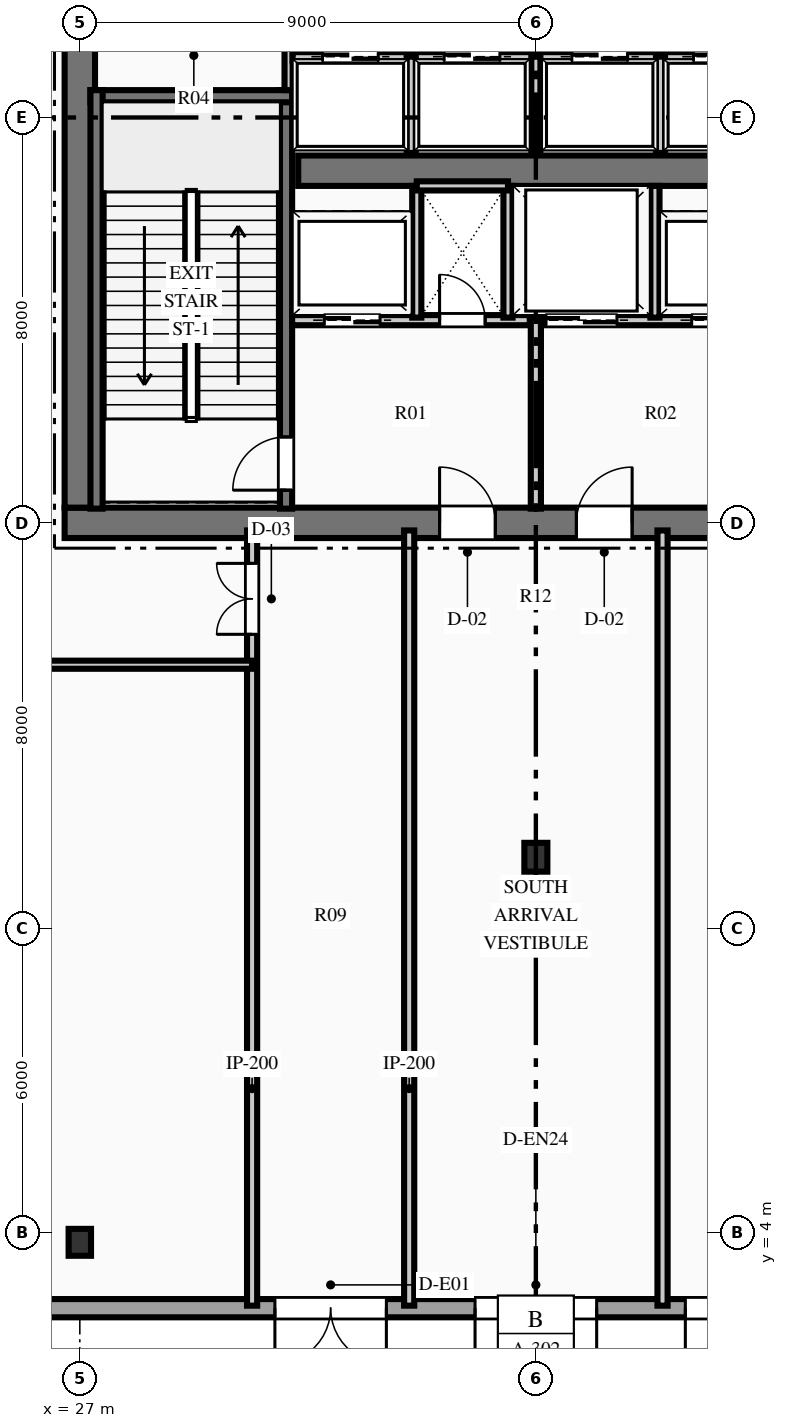
"""IFC4 building model, lengths in metres.
Left out: names, types, materials, properties, quantities, classifications, styles, units other than length and angle.
Written with IfcOpenShell. Run it as: python <this file> out.ifc"""

import sys

from ifc_helpers import new_model, si_unit, direction, frame, frame_2d, origin, origin_2d, place, context, subcontext, project, spatial, rectangle, i_section, extrude, element, fill, save


model = new_model("IFC4")
c1 = context("Model", 3, precision=1e-05, world=origin(), true_north=direction((0.0, 1.0)))
c2 = subcontext(c1, "Body", "Model", "MODEL_VIEW")
j1 = project(units=[si_unit("LENGTHUNIT", "METRE"), si_unit("PLANEANGLEUNIT", "RADIAN")], contexts=[c1])
p1 = place(None, origin())
s1 = spatial("IfcSite", under=j1, at=p1, CompositionType="ELEMENT")
p2 = place(p1, origin())
s2 = spatial("IfcBuilding", under=s1, at=p2, CompositionType="ELEMENT")
p3 = place(p2, origin())
s3 = spatial("IfcBuildingStorey", under=s2, at=p3, CompositionType="ELEMENT", Elevation=0.0)
p4 = place(p3, frame((26.7, 18.0, 0.0), z_axis=(0.0, 0.0, 1.0), x_axis=(1.0, 0.0, 0.0)))
e1 = element("IfcWall", 1, at=p4, inside=s3, PredefinedType="SHEAR", context=c2, shape_type="SweptSolid", body=[
    extrude(rectangle(XDim=18.6, YDim=0.6, at=frame_2d((9.3, 0.0))), origin(), (0.0, 0.0, 1.0), 6.0),
])
p5 = place(p4, frame((7.4, 0.0, 0.0)))
e2 = element("IfcOpeningElement", 2, at=p5, cuts=e1, PredefinedType="OPENING", context=c2, shape_type="SweptSolid", body=[
    extrude(rectangle(XDim=1.1, YDim=2.15, at=frame_2d((0.55, 1.075))), frame((0.0, 0.31, 0.0), z_axis=(0.0, -1.0, 0.0), x_axis=(1.0, 0.0, 0.0)), (0.0, 0.0, 1.0), 0.62),
])
p6 = place(p4, frame((10.1, 0.0, 0.0)))
e3 = element("IfcOpeningElement", 3, at=p6, cuts=e1, PredefinedType="OPENING", context=c2, shape_type="SweptSolid", body=[
    extrude(rectangle(XDim=1.1, YDim=2.15, at=frame_2d((0.55, 1.075))), frame((0.0, 0.31, 0.0), z_axis=(0.0, -1.0, 0.0), x_axis=(1.0, 0.0, 0.0)), (0.0, 0.0, 1.0), 0.62),
])
p7 = place(p3, frame((27.0, 18.3, 0.0), z_axis=(0.0, 0.0, 1.0), x_axis=(0.0, 1.0, 0.0)))
e4 = element("IfcWall", 4, at=p7, inside=s3, PredefinedType="SHEAR", context=c2, shape_type="SweptSolid", body=[
    extrude(rectangle(XDim=15.4, YDim=0.6, at=frame_2d((7.7, 0.0))), origin(), (0.0, 0.0, 1.0), 6.0),
])
p8 = place(p7, frame((9.94, 0.0, 0.0)))
e5 = element("IfcOpeningElement", 5, at=p8, cuts=e4, PredefinedType="OPENING", context=c2, shape_type="SweptSolid", body=[
    extrude(rectangle(XDim=1.4, YDim=2.2, at=frame_2d((0.7, 1.1))), frame((0.0, 0.31, 0.0), z_axis=(0.0, -1.0, 0.0), x_axis=(1.0, 0.0, 0.0)), (0.0, 0.0, 1.0), 0.62),
])
p9 = place(p3, frame((31.31, 24.95, 0.0), z_axis=(0.0, 0.0, 1.0), x_axis=(1.0, 0.0, 0.0)))
e6 = element("IfcWall", 6, at=p9, inside=s3, PredefinedType="SHEAR", context=c2, shape_type="SweptSolid", body=[
    extrude(rectangle(XDim=9.38, YDim=0.6, at=frame_2d((4.69, 0.0))), origin(), (0.0, 0.0, 1.0), 6.0),
])
p10 = place(p3, frame((31.07, 18.28, 0.0), z_axis=(0.0, 0.0, 1.0), x_axis=(0.0, 1.0, 0.0)))
e7 = element("IfcWall", 7, at=p10, inside=s3, PredefinedType="SHEAR", context=c2, shape_type="SweptSolid", body=[
    extrude(rectangle(XDim=8.26, YDim=0.24, at=frame_2d((4.13, 0.0))), origin(), (0.0, 0.0, 1.0), 6.0),
])
p11 = place(p10, frame((0.365, 0.0, 0.0)))
e8 = element("IfcOpeningElement", 8, at=p11, cuts=e7, PredefinedType="OPENING", context=c2, shape_type="SweptSolid", body=[
    extrude(rectangle(XDim=1.05, YDim=2.15, at=frame_2d((0.525, 1.075))), frame((0.0, 0.13, 0.0), z_axis=(0.0, -1.0, 0.0), x_axis=(1.0, 0.0, 0.0)), (0.0, 0.0, 1.0), 0.26),
])
p12 = place(p3, frame((27.21, 26.42, 0.0), z_axis=(0.0, 0.0, 1.0), x_axis=(1.0, 0.0, 0.0)))
e9 = element("IfcWall", 9, at=p12, inside=s3, PredefinedType="SHEAR", context=c2, shape_type="SweptSolid", body=[
    extrude(rectangle(XDim=3.98, YDim=0.24, at=frame_2d((1.99, 0.0))), origin(), (0.0, 0.0, 1.0), 6.0),
])
p13 = place(p3, frame((27.33, 18.28, 0.0), z_axis=(0.0, 0.0, 1.0), x_axis=(0.0, 1.0, 0.0)))
e10 = element("IfcWall", 10, at=p13, inside=s3, PredefinedType="SHEAR", context=c2, shape_type="SweptSolid", body=[
    extrude(rectangle(XDim=8.26, YDim=0.24, at=frame_2d((4.13, 0.0))), origin(), (0.0, 0.0, 1.0), 6.0),
])
p14 = place(p3, frame((36.0, 11.4, 0.0), z_axis=(0.0, 0.0, 1.0), x_axis=(1.0, 0.0, 0.0)))
e11 = element("IfcColumn", 11, at=p14, inside=s3, PredefinedType="COLUMN", context=c2, shape_type="SweptSolid", body=[
    extrude(i_section(OverallWidth=0.454, OverallDepth=0.569, WebThickness=0.078, FlangeThickness=0.125, at=origin_2d()), origin(), (0.0, 0.0, 1.0), 6.0),
])
p15 = place(p3, frame((27.0, 3.8, 0.0), z_axis=(0.0, 0.0, 1.0), x_axis=(1.0, 0.0, 0.0)))
e12 = element("IfcColumn", 12, at=p15, inside=s3, PredefinedType="PILASTER", context=c2, shape_type="SweptSolid", body=[
    extrude(i_section(OverallWidth=0.442, OverallDepth=0.531, WebThickness=0.066, FlangeThickness=0.106, at=origin_2d()), origin(), (0.0, 0.0, 1.0), 6.0),
])
p16 = place(p3, frame((64.0, 2.5, 0.0), z_axis=(0.0, 0.0, 1.0), x_axis=(-1.0, 0.0, 0.0)))
e13 = element("IfcWall", 13, at=p16, inside=s3, PredefinedType="STANDARD", context=c2, shape_type="SweptSolid", body=[
    extrude(rectangle(XDim=56.0, YDim=0.36, at=frame_2d((28.0, 0.0))), origin(), (0.0, 0.0, 1.0), 5.67),
])
p17 = place(p16, frame((30.95, 0.0, 0.0)))
e14 = element("IfcOpeningElement", 14, at=p17, cuts=e13, PredefinedType="OPENING", context=c2, shape_type="SweptSolid", body=[
    extrude(rectangle(XDim=2.2, YDim=2.4, at=frame_2d((1.1, 1.2))), frame((0.0, 0.19, 0.0), z_axis=(0.0, -1.0, 0.0), x_axis=(1.0, 0.0, 0.0)), (0.0, 0.0, 1.0), 0.38),
])
p18 = place(p16, frame((22.85, 0.0, 0.0)))
e15 = element("IfcOpeningElement", 15, at=p18, cuts=e13, PredefinedType="OPENING", context=c2, shape_type="SweptSolid", body=[
    extrude(rectangle(XDim=2.2, YDim=2.4, at=frame_2d((1.1, 1.2))), frame((0.0, 0.19, 0.0), z_axis=(0.0, -1.0, 0.0), x_axis=(1.0, 0.0, 0.0)), (0.0, 0.0, 1.0), 0.38),
])
p19 = place(p16, frame((42.4, 0.0, 0.0)))
e16 = element("IfcOpeningElement", 16, at=p19, cuts=e13, PredefinedType="OPENING", context=c2, shape_type="SweptSolid", body=[
    extrude(rectangle(XDim=2.2, YDim=2.4, at=frame_2d((1.1, 1.2))), frame((0.0, 0.19, 0.0), z_axis=(0.0, -1.0, 0.0), x_axis=(1.0, 0.0, 0.0)), (0.0, 0.0, 1.0), 0.38),
])
p20 = place(p16, frame((11.4, 0.0, 0.0)))
e17 = element("IfcOpeningElement", 17, at=p20, cuts=e13, PredefinedType="OPENING", context=c2, shape_type="SweptSolid", body=[
    extrude(rectangle(XDim=2.2, YDim=2.4, at=frame_2d((1.1, 1.2))), frame((0.0, 0.19, 0.0), z_axis=(0.0, -1.0, 0.0), x_axis=(1.0, 0.0, 0.0)), (0.0, 0.0, 1.0), 0.38),
])
p21 = place(p16, frame((26.8, 0.0, 0.0)))
e18 = element("IfcOpeningElement", 18, at=p21, cuts=e13, PredefinedType="OPENING", context=c2, shape_type="SweptSolid", body=[
    extrude(rectangle(XDim=2.4, YDim=2.6, at=frame_2d((1.2, 1.3))), frame((0.0, 0.19, 0.0), z_axis=(0.0, -1.0, 0.0), x_axis=(1.0, 0.0, 0.0)), (0.0, 0.0, 1.0), 0.38),
])
p22 = place(p16, frame((52.1, 0.0, 1.0)))
e19 = element("IfcOpeningElement", 19, at=p22, cuts=e13, PredefinedType="OPENING", context=c2, shape_type="SweptSolid", body=[
    extrude(rectangle(XDim=1.8, YDim=2.4, at=frame_2d((0.9, 1.2))), frame((0.0, 0.19, 0.0), z_axis=(0.0, -1.0, 0.0), x_axis=(1.0, 0.0, 0.0)), (0.0, 0.0, 1.0), 0.38),
])
p23 = place(p16, frame((2.1, 0.0, 1.0)))
e20 = element("IfcOpeningElement", 20, at=p23, cuts=e13, PredefinedType="OPENING", context=c2, shape_type="SweptSolid", body=[
    extrude(rectangle(XDim=1.8, YDim=2.4, at=frame_2d((0.9, 1.2))), frame((0.0, 0.19, 0.0), z_axis=(0.0, -1.0, 0.0), x_axis=(1.0, 0.0, 0.0)), (0.0, 0.0, 1.0), 0.38),
])
p24 = place(p3, frame((36.0, 18.28, 0.0), z_axis=(0.0, 0.0, 1.0), x_axis=(0.0, 1.0, 0.0)))
e21 = element("IfcWall", 21, at=p24, inside=s3, PredefinedType="PARTITIONING", context=c2, shape_type="SweptSolid", body=[
    extrude(rectangle(XDim=3.77, YDim=0.2, at=frame_2d((1.885, 0.0))), origin(), (0.0, 0.0, 1.0), 5.67),
])
p25 = place(p3, frame((31.19, 22.0, 0.0), z_axis=(0.0, 0.0, 1.0), x_axis=(1.0, 0.0, 0.0)))
e22 = element("IfcWall", 22, at=p25, inside=s3, PredefinedType="PARTITIONING", context=c2, shape_type="SweptSolid", body=[
    extrude(rectangle(XDim=4.69, YDim=0.2, at=frame_2d((2.345, 0.0))), origin(), (0.0, 0.0, 1.0), 5.67),
])
p26 = place(p25, frame((2.91, 0.0, 0.0)))
e23 = element("IfcOpeningElement", 23, at=p26, cuts=e22, PredefinedType="OPENING", context=c2, shape_type="SweptSolid", body=[
    extrude(rectangle(XDim=0.9, YDim=2.15, at=frame_2d((0.45, 1.075))), frame((0.0, 0.11, 0.0), z_axis=(0.0, -1.0, 0.0), x_axis=(1.0, 0.0, 0.0)), (0.0, 0.0, 1.0), 0.22),
])
p27 = place(p25, frame((0.635, 0.0, 0.0)))
e24 = element("IfcOpeningElement", 24, at=p27, cuts=e22, PredefinedType="OPENING", context=c2, shape_type="SweptSolid", body=[
    extrude(rectangle(XDim=1.1, YDim=2.15, at=frame_2d((0.55, 1.075))), frame((0.0, 0.11, 0.0), z_axis=(0.0, -1.0, 0.0), x_axis=(1.0, 0.0, 0.0)), (0.0, 0.0, 1.0), 0.22),
])
p28 = place(p3, frame((36.12, 22.0, 0.0), z_axis=(0.0, 0.0, 1.0), x_axis=(1.0, 0.0, 0.0)))
e25 = element("IfcWall", 25, at=p28, inside=s3, PredefinedType="PARTITIONING", context=c2, shape_type="SweptSolid", body=[
    extrude(rectangle(XDim=4.69, YDim=0.2, at=frame_2d((2.345, 0.0))), origin(), (0.0, 0.0, 1.0), 5.67),
])
p29 = place(p28, frame((2.955, 0.0, 0.0)))
e26 = element("IfcOpeningElement", 26, at=p29, cuts=e25, PredefinedType="OPENING", context=c2, shape_type="SweptSolid", body=[
    extrude(rectangle(XDim=1.1, YDim=2.15, at=frame_2d((0.55, 1.075))), frame((0.0, 0.11, 0.0), z_axis=(0.0, -1.0, 0.0), x_axis=(1.0, 0.0, 0.0)), (0.0, 0.0, 1.0), 0.22),
])
p30 = place(p28, frame((0.08, 0.0, 0.0)))
e27 = element("IfcOpeningElement", 27, at=p30, cuts=e25, PredefinedType="OPENING", context=c2, shape_type="SweptSolid", body=[
    extrude(rectangle(XDim=1.4, YDim=2.2, at=frame_2d((0.7, 1.1))), frame((0.0, 0.11, 0.0), z_axis=(0.0, -1.0, 0.0), x_axis=(1.0, 0.0, 0.0)), (0.0, 0.0, 1.0), 0.22),
])
for number, where, z_axis, x_axis in (
    (28, (33.65, 22.05, 0.0), (0.0, 0.0, 1.0), (0.0, 1.0, 0.0)),
    (29, (35.45, 22.05, 0.0), (0.0, 0.0, 1.0), (0.0, 1.0, 0.0)),
):
    element("IfcWall", number, at=place(p3, frame(where, z_axis=z_axis, x_axis=x_axis)), inside=s3, PredefinedType="PARTITIONING", context=c2, shape_type="SweptSolid", body=[
        extrude(rectangle(XDim=2.6, YDim=0.18, at=frame_2d((1.3, 0.0))), origin(), (0.0, 0.0, 1.0), 5.67),
    ])
p31 = place(p3, frame((33.65, 24.65, 0.0), z_axis=(0.0, 0.0, 1.0), x_axis=(1.0, 0.0, 0.0)))
e30 = element("IfcWall", 30, at=p31, inside=s3, PredefinedType="PARTITIONING", context=c2, shape_type="SweptSolid", body=[
    extrude(rectangle(XDim=1.8, YDim=0.18, at=frame_2d((0.9, 0.0))), origin(), (0.0, 0.0, 1.0), 5.67),
])
p32 = place(p3, frame((38.35, 22.05, 0.0), z_axis=(0.0, 0.0, 1.0), x_axis=(0.0, 1.0, 0.0)))
e31 = element("IfcWall", 31, at=p32, inside=s3, PredefinedType="PARTITIONING", context=c2, shape_type="SweptSolid", body=[
    extrude(rectangle(XDim=2.6, YDim=0.18, at=frame_2d((1.3, 0.0))), origin(), (0.0, 0.0, 1.0), 5.67),
])
p33 = place(p3, frame((31.12, 26.54, 0.0), z_axis=(0.0, 0.0, 1.0), x_axis=(0.0, 1.0, 0.0)))
e32 = element("IfcWall", 32, at=p33, inside=s3, PredefinedType="PARTITIONING", context=c2, shape_type="SweptSolid", body=[
    extrude(rectangle(XDim=1.51, YDim=0.16, at=frame_2d((0.755, 0.0))), origin(), (0.0, 0.0, 1.0), 5.67),
])
p34 = place(p3, frame((31.2, 27.2, 0.0), z_axis=(0.0, 0.0, 1.0), x_axis=(1.0, 0.0, 0.0)))
e33 = element("IfcWall", 33, at=p34, inside=s3, PredefinedType="PARTITIONING", context=c2, shape_type="SweptSolid", body=[
    extrude(rectangle(XDim=9.6, YDim=0.18, at=frame_2d((4.8, 0.0))), origin(), (0.0, 0.0, 1.0), 5.67),
])
p35 = place(p34, frame((0.59, 0.0, 0.0)))
e34 = element("IfcOpeningElement", 34, at=p35, cuts=e33, PredefinedType="OPENING", context=c2, shape_type="SweptSolid", body=[
    extrude(rectangle(XDim=1.1, YDim=2.15, at=frame_2d((0.55, 1.075))), frame((0.0, 0.1, 0.0), z_axis=(0.0, -1.0, 0.0), x_axis=(1.0, 0.0, 0.0)), (0.0, 0.0, 1.0), 0.2),
])
p36 = place(p34, frame((2.99, 0.0, 0.0)))
e35 = element("IfcOpeningElement", 35, at=p36, cuts=e33, PredefinedType="OPENING", context=c2, shape_type="SweptSolid", body=[
    extrude(rectangle(XDim=1.1, YDim=2.15, at=frame_2d((0.55, 1.075))), frame((0.0, 0.1, 0.0), z_axis=(0.0, -1.0, 0.0), x_axis=(1.0, 0.0, 0.0)), (0.0, 0.0, 1.0), 0.2),
])
p37 = place(p34, frame((5.51, 0.0, 0.0)))
e36 = element("IfcOpeningElement", 36, at=p37, cuts=e33, PredefinedType="OPENING", context=c2, shape_type="SweptSolid", body=[
    extrude(rectangle(XDim=1.1, YDim=2.15, at=frame_2d((0.55, 1.075))), frame((0.0, 0.1, 0.0), z_axis=(0.0, -1.0, 0.0), x_axis=(1.0, 0.0, 0.0)), (0.0, 0.0, 1.0), 0.2),
])
p38 = place(p34, frame((7.91, 0.0, 0.0)))
e37 = element("IfcOpeningElement", 37, at=p38, cuts=e33, PredefinedType="OPENING", context=c2, shape_type="SweptSolid", body=[
    extrude(rectangle(XDim=1.1, YDim=2.15, at=frame_2d((0.55, 1.075))), frame((0.0, 0.1, 0.0), z_axis=(0.0, -1.0, 0.0), x_axis=(1.0, 0.0, 0.0)), (0.0, 0.0, 1.0), 0.2),
])
for number, where, z_axis, x_axis in (
    (38, (33.54, 25.3, 0.0), (0.0, 0.0, 1.0), (0.0, 1.0, 0.0)),
    (39, (36.0, 25.3, 0.0), (0.0, 0.0, 1.0), (0.0, 1.0, 0.0)),
    (40, (38.46, 25.3, 0.0), (0.0, 0.0, 1.0), (0.0, 1.0, 0.0)),
):
    element("IfcWall", number, at=place(p3, frame(where, z_axis=z_axis, x_axis=x_axis)), inside=s3, PredefinedType="PARTITIONING", context=c2, shape_type="SweptSolid", body=[
        extrude(rectangle(XDim=1.9, YDim=0.18, at=frame_2d((0.95, 0.0))), origin(), (0.0, 0.0, 1.0), 5.67),
    ])
p39 = place(p3, frame((30.4, 2.55, 0.0), z_axis=(0.0, 0.0, 1.0), x_axis=(0.0, 1.0, 0.0)))
e41 = element("IfcWall", 41, at=p39, inside=s3, PredefinedType="PARTITIONING", context=c2, shape_type="SweptSolid", body=[
    extrude(rectangle(XDim=15.3, YDim=0.2, at=frame_2d((7.65, 0.0))), origin(), (0.0, 0.0, 1.0), 5.67),
])
p40 = place(p39, frame((13.25, 0.0, 0.0)))
e42 = element("IfcOpeningElement", 42, at=p40, cuts=e41, PredefinedType="OPENING", context=c2, shape_type="SweptSolid", body=[
    extrude(rectangle(XDim=1.4, YDim=2.2, at=frame_2d((0.7, 1.1))), frame((0.0, 0.11, 0.0), z_axis=(0.0, -1.0, 0.0), x_axis=(1.0, 0.0, 0.0)), (0.0, 0.0, 1.0), 0.22),
])
for number, where, z_axis, x_axis in (
    (43, (33.5, 2.55, 0.0), (0.0, 0.0, 1.0), (0.0, 1.0, 0.0)),
    (44, (38.5, 2.55, 0.0), (0.0, 0.0, 1.0), (0.0, 1.0, 0.0)),
):
    element("IfcWall", number, at=place(p3, frame(where, z_axis=z_axis, x_axis=x_axis)), inside=s3, PredefinedType="PARTITIONING", context=c2, shape_type="SweptSolid", body=[
        extrude(rectangle(XDim=15.3, YDim=0.2, at=frame_2d((7.65, 0.0))), origin(), (0.0, 0.0, 1.0), 5.67),
    ])
p41 = place(p3, frame((8.1, 15.2, 0.0), z_axis=(0.0, 0.0, 1.0), x_axis=(1.0, 0.0, 0.0)))
e45 = element("IfcWall", 45, at=p41, inside=s3, PredefinedType="PARTITIONING", context=c2, shape_type="SweptSolid", body=[
    extrude(rectangle(XDim=22.3, YDim=0.16, at=frame_2d((11.15, 0.0))), origin(), (0.0, 0.0, 1.0), 4.803),
])
p42 = place(p41, frame((16.6, 0.0, 0.0)))
e46 = element("IfcOpeningElement", 46, at=p42, cuts=e45, PredefinedType="OPENING", context=c2, shape_type="SweptSolid", body=[
    extrude(rectangle(XDim=1.6, YDim=2.2, at=frame_2d((0.8, 1.1))), frame((0.0, 0.09, 0.0), z_axis=(0.0, -1.0, 0.0), x_axis=(1.0, 0.0, 0.0)), (0.0, 0.0, 1.0), 0.18),
])
p43 = place(p17, origin())
e47 = element("IfcDoor", 47, at=p43, inside=s3, OperationType="DOUBLE_DOOR_SINGLE_SWING", PredefinedType="DOOR", context=c2, shape_type="SweptSolid", body=[
    extrude(rectangle(XDim=2.2, YDim=2.4, at=frame_2d((1.1, 1.2))), frame((0.0, 0.025, 0.0), z_axis=(0.0, -1.0, 0.0), x_axis=(1.0, 0.0, 0.0)), (0.0, 0.0, 1.0), 0.05),
])
fill(e14, e47)
p44 = place(p18, origin())
e48 = element("IfcDoor", 48, at=p44, inside=s3, OperationType="DOUBLE_DOOR_SINGLE_SWING", PredefinedType="DOOR", context=c2, shape_type="SweptSolid", body=[
    extrude(rectangle(XDim=2.2, YDim=2.4, at=frame_2d((1.1, 1.2))), frame((0.0, 0.025, 0.0), z_axis=(0.0, -1.0, 0.0), x_axis=(1.0, 0.0, 0.0)), (0.0, 0.0, 1.0), 0.05),
])
fill(e15, e48)
p45 = place(p21, origin())
e49 = element("IfcDoor", 49, at=p45, inside=s3, OperationType="DOUBLE_DOOR_SINGLE_SWING", PredefinedType="DOOR", context=c2, shape_type="SweptSolid", body=[
    extrude(rectangle(XDim=2.4, YDim=2.6, at=frame_2d((1.2, 1.3))), frame((0.0, 0.025, 0.0), z_axis=(0.0, -1.0, 0.0), x_axis=(1.0, 0.0, 0.0)), (0.0, 0.0, 1.0), 0.05),
])
fill(e18, e49)
p46 = place(p11, origin())
e50 = element("IfcDoor", 50, at=p46, inside=s3, OperationType="SINGLE_SWING_LEFT", PredefinedType="DOOR", context=c2, shape_type="SweptSolid", body=[
    extrude(rectangle(XDim=1.05, YDim=2.15, at=frame_2d((0.525, 1.075))), frame((0.0, 0.025, 0.0), z_axis=(0.0, -1.0, 0.0), x_axis=(1.0, 0.0, 0.0)), (0.0, 0.0, 1.0), 0.05),
])
fill(e8, e50)
p47 = place(p5, origin())
e51 = element("IfcDoor", 51, at=p47, inside=s3, OperationType="SINGLE_SWING_LEFT", PredefinedType="DOOR", context=c2, shape_type="SweptSolid", body=[
    extrude(rectangle(XDim=1.1, YDim=2.15, at=frame_2d((0.55, 1.075))), frame((0.0, 0.025, 0.0), z_axis=(0.0, -1.0, 0.0), x_axis=(1.0, 0.0, 0.0)), (0.0, 0.0, 1.0), 0.05),
])
fill(e2, e51)
p48 = place(p6, origin())
e52 = element("IfcDoor", 52, at=p48, inside=s3, OperationType="SINGLE_SWING_RIGHT", PredefinedType="DOOR", context=c2, shape_type="SweptSolid", body=[
    extrude(rectangle(XDim=1.1, YDim=2.15, at=frame_2d((0.55, 1.075))), frame((0.0, 0.025, 0.0), z_axis=(0.0, -1.0, 0.0), x_axis=(1.0, 0.0, 0.0)), (0.0, 0.0, 1.0), 0.05),
])
fill(e3, e52)
p49 = place(p26, origin())
e53 = element("IfcDoor", 53, at=p49, inside=s3, OperationType="SINGLE_SWING_LEFT", PredefinedType="DOOR", context=c2, shape_type="SweptSolid", body=[
    extrude(rectangle(XDim=0.9, YDim=2.15, at=frame_2d((0.45, 1.075))), frame((0.0, 0.025, 0.0), z_axis=(0.0, -1.0, 0.0), x_axis=(1.0, 0.0, 0.0)), (0.0, 0.0, 1.0), 0.05),
])
fill(e23, e53)
p50 = place(p40, origin())
e54 = element("IfcDoor", 54, at=p50, inside=s3, OperationType="DOUBLE_DOOR_SINGLE_SWING", PredefinedType="DOOR", context=c2, shape_type="SweptSolid", body=[
    extrude(rectangle(XDim=1.4, YDim=2.2, at=frame_2d((0.7, 1.1))), frame((0.0, 0.025, 0.0), z_axis=(0.0, -1.0, 0.0), x_axis=(1.0, 0.0, 0.0)), (0.0, 0.0, 1.0), 0.05),
])
fill(e42, e54)
p51 = place(p35, origin())
e55 = element("IfcDoor", 55, at=p51, inside=s3, OperationType="SLIDING_TO_LEFT", PredefinedType="DOOR", context=c2, shape_type="SweptSolid", body=[
    extrude(rectangle(XDim=1.1, YDim=2.15, at=frame_2d((0.55, 1.075))), frame((0.0, 0.025, 0.0), z_axis=(0.0, -1.0, 0.0), x_axis=(1.0, 0.0, 0.0)), (0.0, 0.0, 1.0), 0.05),
])
fill(e34, e55)
p52 = place(p36, origin())
e56 = element("IfcDoor", 56, at=p52, inside=s3, OperationType="SLIDING_TO_LEFT", PredefinedType="DOOR", context=c2, shape_type="SweptSolid", body=[
    extrude(rectangle(XDim=1.1, YDim=2.15, at=frame_2d((0.55, 1.075))), frame((0.0, 0.025, 0.0), z_axis=(0.0, -1.0, 0.0), x_axis=(1.0, 0.0, 0.0)), (0.0, 0.0, 1.0), 0.05),
])
fill(e35, e56)
p53 = place(p37, origin())
e57 = element("IfcDoor", 57, at=p53, inside=s3, OperationType="SLIDING_TO_LEFT", PredefinedType="DOOR", context=c2, shape_type="SweptSolid", body=[
    extrude(rectangle(XDim=1.1, YDim=2.15, at=frame_2d((0.55, 1.075))), frame((0.0, 0.025, 0.0), z_axis=(0.0, -1.0, 0.0), x_axis=(1.0, 0.0, 0.0)), (0.0, 0.0, 1.0), 0.05),
])
fill(e36, e57)
p54 = place(p38, origin())
e58 = element("IfcDoor", 58, at=p54, inside=s3, OperationType="SLIDING_TO_LEFT", PredefinedType="DOOR", context=c2, shape_type="SweptSolid", body=[
    extrude(rectangle(XDim=1.1, YDim=2.15, at=frame_2d((0.55, 1.075))), frame((0.0, 0.025, 0.0), z_axis=(0.0, -1.0, 0.0), x_axis=(1.0, 0.0, 0.0)), (0.0, 0.0, 1.0), 0.05),
])
fill(e37, e58)
p55 = place(p27, origin())
e59 = element("IfcDoor", 59, at=p55, inside=s3, OperationType="SLIDING_TO_LEFT", PredefinedType="DOOR", context=c2, shape_type="SweptSolid", body=[
    extrude(rectangle(XDim=1.1, YDim=2.15, at=frame_2d((0.55, 1.075))), frame((0.0, 0.025, 0.0), z_axis=(0.0, -1.0, 0.0), x_axis=(1.0, 0.0, 0.0)), (0.0, 0.0, 1.0), 0.05),
])
fill(e24, e59)
p56 = place(p29, origin())
e60 = element("IfcDoor", 60, at=p56, inside=s3, OperationType="SLIDING_TO_LEFT", PredefinedType="DOOR", context=c2, shape_type="SweptSolid", body=[
    extrude(rectangle(XDim=1.1, YDim=2.15, at=frame_2d((0.55, 1.075))), frame((0.0, 0.025, 0.0), z_axis=(0.0, -1.0, 0.0), x_axis=(1.0, 0.0, 0.0)), (0.0, 0.0, 1.0), 0.05),
])
fill(e26, e60)
p57 = place(p30, origin())
e61 = element("IfcDoor", 61, at=p57, inside=s3, OperationType="SLIDING_TO_LEFT", PredefinedType="DOOR", context=c2, shape_type="SweptSolid", body=[
    extrude(rectangle(XDim=1.4, YDim=2.2, at=frame_2d((0.7, 1.1))), frame((0.0, 0.025, 0.0), z_axis=(0.0, -1.0, 0.0), x_axis=(1.0, 0.0, 0.0)), (0.0, 0.0, 1.0), 0.05),
])
fill(e27, e61)
save(model, sys.argv[1])
